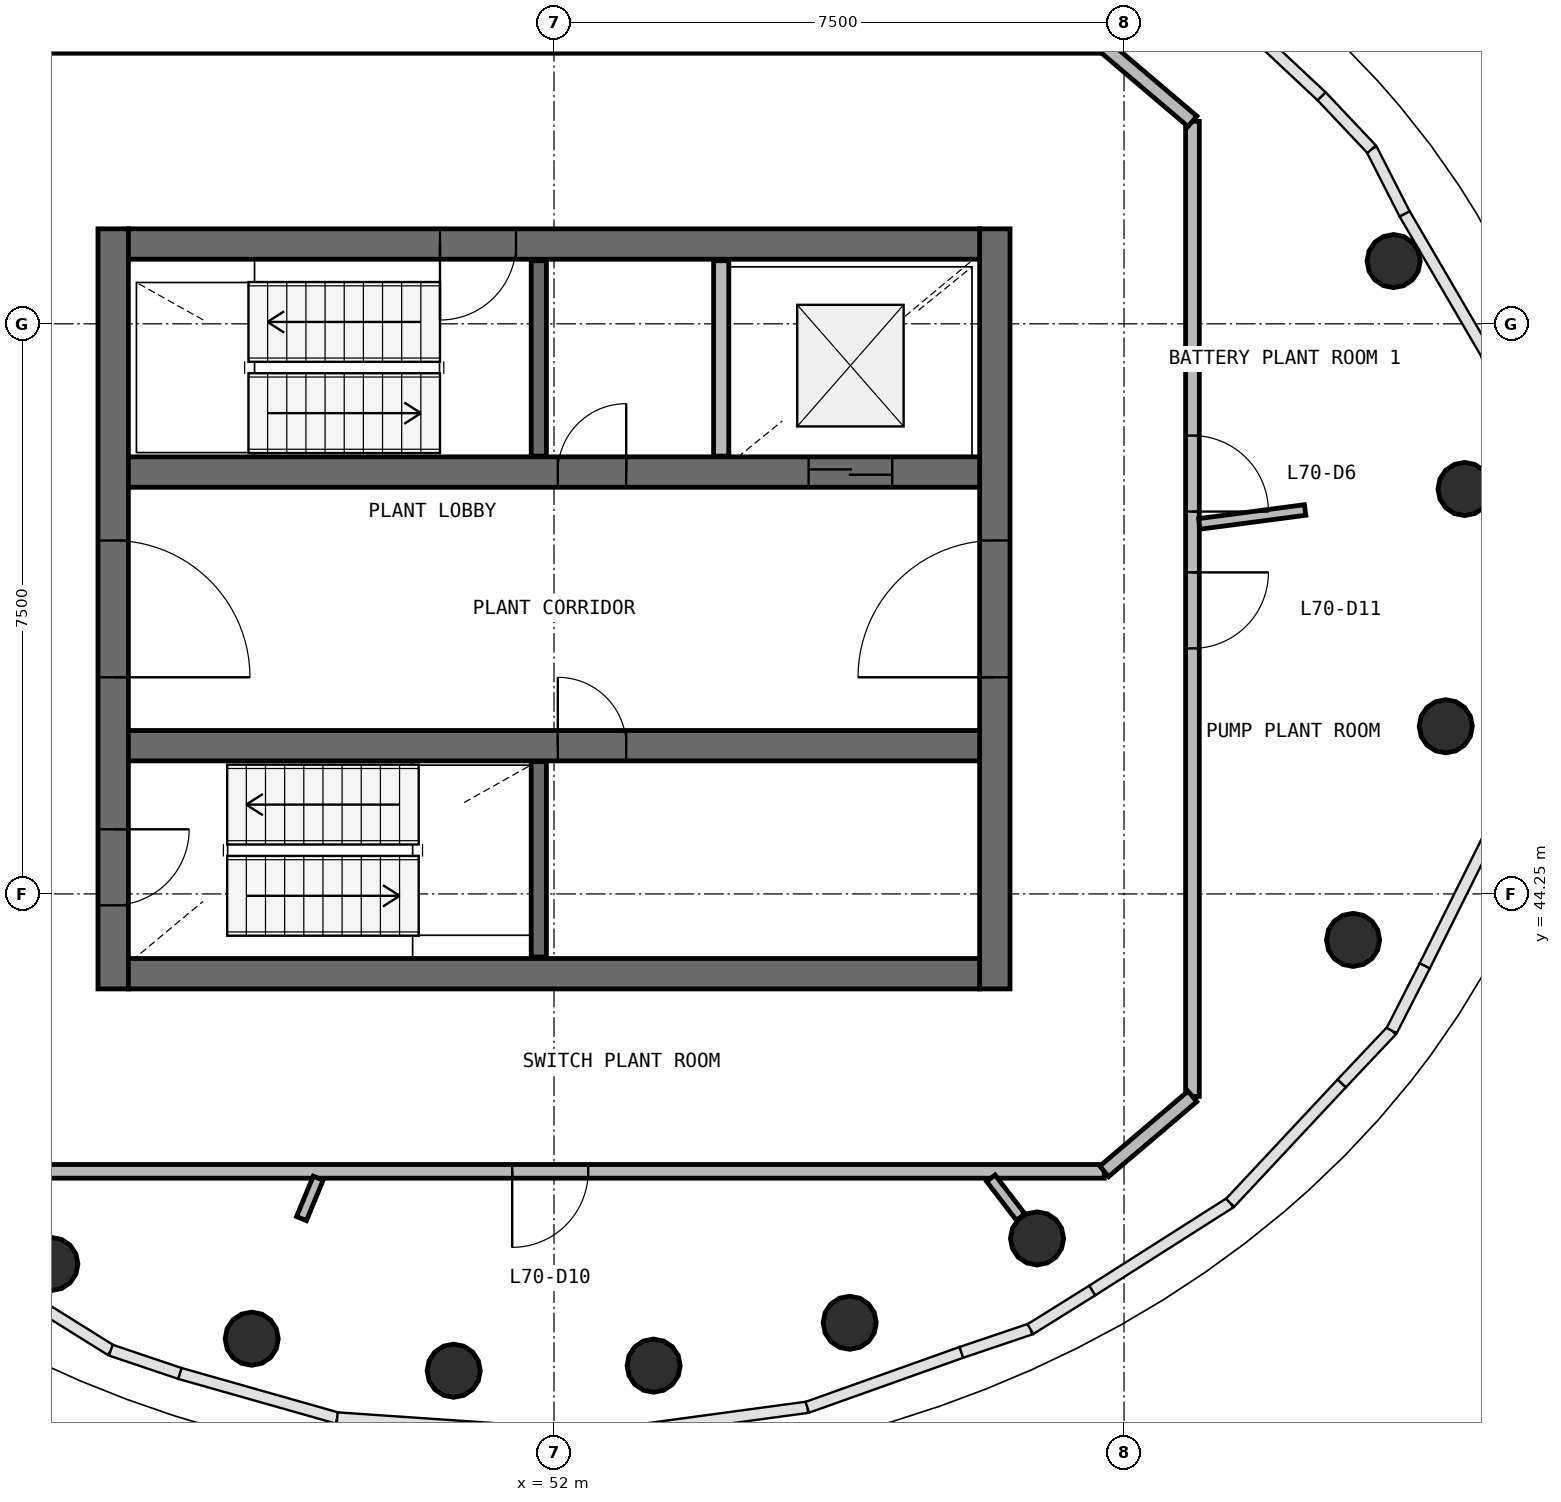
"""IFC4 building model, lengths in metres.
Left out: names, types, materials, properties, quantities, classifications, styles, units other than length and angle.
Written with IfcOpenShell. Run it as: python <this file> out.ifc"""

import sys

from ifc_helpers import new_model, si_unit, direction, frame, frame_2d, origin, origin_2d, place, context, subcontext, project, spatial, rectangle, circle, extrude, source, transform, mapped, element, fill, save


model = new_model("IFC4")
c1 = context("Model", 3, precision=1e-05, world=origin(), true_north=direction((0.0, 1.0)))
c2 = subcontext(c1, "Body", "Model", "MODEL_VIEW")
j1 = project(units=[si_unit("LENGTHUNIT", "METRE"), si_unit("PLANEANGLEUNIT", "RADIAN")], contexts=[c1])
p1 = place(None, origin())
s1 = spatial("IfcSite", under=j1, at=p1, CompositionType="ELEMENT")
p2 = place(p1, origin())
s2 = spatial("IfcBuilding", under=s1, at=p2, CompositionType="ELEMENT")
p3 = place(p2, frame((0.0, 0.0, 283.6)))
s3 = spatial("IfcBuildingStorey", under=s2, at=p3, CompositionType="ELEMENT", Elevation=283.6)
p4 = place(p3, frame((57.8, 43.0, 0.0), z_axis=(0.0, 0.0, 1.0), x_axis=(0.0, 1.0, 0.0)))
e1 = element("IfcWall", 1, at=p4, inside=s3, PredefinedType="SHEAR", context=c2, shape_type="SweptSolid", body=[
    extrude(rectangle(XDim=10.0, YDim=0.4, at=frame_2d((5.0, 0.0))), origin(), (0.0, 0.0, 1.0), 3.5),
])
p5 = place(p4, frame((4.1, 0.0, 0.0)))
e2 = element("IfcOpeningElement", 2, at=p5, cuts=e1, PredefinedType="OPENING", context=c2, shape_type="SweptSolid", body=[
    extrude(rectangle(XDim=1.8, YDim=2.1, at=frame_2d((0.9, 1.05))), frame((0.0, 0.21, 0.0), z_axis=(0.0, -1.0, 0.0), x_axis=(1.0, 0.0, 0.0)), (0.0, 0.0, 1.0), 0.42),
])
p6 = place(p3, frame((46.2, 53.0, 0.0), z_axis=(0.0, 0.0, 1.0), x_axis=(0.0, -1.0, 0.0)))
e3 = element("IfcWall", 3, at=p6, inside=s3, PredefinedType="SHEAR", context=c2, shape_type="SweptSolid", body=[
    extrude(rectangle(XDim=10.0, YDim=0.4, at=frame_2d((5.0, 0.0))), origin(), (0.0, 0.0, 1.0), 3.5),
])
p7 = place(p6, frame((4.1, 0.0, 0.0)))
e4 = element("IfcOpeningElement", 4, at=p7, cuts=e3, PredefinedType="OPENING", context=c2, shape_type="SweptSolid", body=[
    extrude(rectangle(XDim=1.8, YDim=2.1, at=frame_2d((0.9, 1.05))), frame((0.0, 0.21, 0.0), z_axis=(0.0, -1.0, 0.0), x_axis=(1.0, 0.0, 0.0)), (0.0, 0.0, 1.0), 0.42),
])
p8 = place(p6, frame((7.9, 0.0, 0.0)))
e5 = element("IfcOpeningElement", 5, at=p8, cuts=e3, PredefinedType="OPENING", context=c2, shape_type="SweptSolid", body=[
    extrude(rectangle(XDim=1.0, YDim=2.1, at=frame_2d((0.5, 1.05))), frame((0.0, 0.21, 0.0), z_axis=(0.0, -1.0, 0.0), x_axis=(1.0, 0.0, 0.0)), (0.0, 0.0, 1.0), 0.42),
])
p9 = place(p3, frame((46.4, 43.2, 0.0), z_axis=(0.0, 0.0, 1.0), x_axis=(1.0, 0.0, 0.0)))
e6 = element("IfcWall", 6, at=p9, inside=s3, PredefinedType="SHEAR", context=c2, shape_type="SweptSolid", body=[
    extrude(rectangle(XDim=11.2, YDim=0.4, at=frame_2d((5.6, 0.0))), origin(), (0.0, 0.0, 1.0), 3.5),
])
p10 = place(p3, frame((57.6, 52.8, 0.0), z_axis=(0.0, 0.0, 1.0), x_axis=(-1.0, 0.0, 0.0)))
e7 = element("IfcWall", 7, at=p10, inside=s3, PredefinedType="SHEAR", context=c2, shape_type="SweptSolid", body=[
    extrude(rectangle(XDim=11.2, YDim=0.4, at=frame_2d((5.6, 0.0))), origin(), (0.0, 0.0, 1.0), 3.5),
])
p11 = place(p10, frame((6.1, 0.0, 0.0)))
e8 = element("IfcOpeningElement", 8, at=p11, cuts=e7, PredefinedType="OPENING", context=c2, shape_type="SweptSolid", body=[
    extrude(rectangle(XDim=1.0, YDim=2.1, at=frame_2d((0.5, 1.05))), frame((0.0, 0.21, 0.0), z_axis=(0.0, -1.0, 0.0), x_axis=(1.0, 0.0, 0.0)), (0.0, 0.0, 1.0), 0.42),
])
p12 = place(p3, frame((46.4, 49.8, 0.0), z_axis=(0.0, 0.0, 1.0), x_axis=(1.0, 0.0, 0.0)))
e9 = element("IfcWall", 9, at=p12, inside=s3, PredefinedType="SHEAR", context=c2, shape_type="SweptSolid", body=[
    extrude(rectangle(XDim=11.2, YDim=0.4, at=frame_2d((5.6, 0.0))), origin(), (0.0, 0.0, 1.0), 3.5),
])
p13 = place(p12, frame((8.95, 0.0, 0.0)))
e10 = element("IfcOpeningElement", 10, at=p13, cuts=e9, PredefinedType="OPENING", context=c2, shape_type="SweptSolid", body=[
    extrude(rectangle(XDim=1.1, YDim=2.1, at=frame_2d((0.55, 1.05))), frame((0.0, 0.21, 0.0), z_axis=(0.0, -1.0, 0.0), x_axis=(1.0, 0.0, 0.0)), (0.0, 0.0, 1.0), 0.42),
])
p14 = place(p12, frame((5.65, 0.0, 0.0)))
e11 = element("IfcOpeningElement", 11, at=p14, cuts=e9, PredefinedType="OPENING", context=c2, shape_type="SweptSolid", body=[
    extrude(rectangle(XDim=0.9, YDim=2.1, at=frame_2d((0.45, 1.05))), frame((0.0, 0.21, 0.0), z_axis=(0.0, -1.0, 0.0), x_axis=(1.0, 0.0, 0.0)), (0.0, 0.0, 1.0), 0.42),
])
p15 = place(p3, frame((46.4, 46.2, 0.0), z_axis=(0.0, 0.0, 1.0), x_axis=(1.0, 0.0, 0.0)))
e12 = element("IfcWall", 12, at=p15, inside=s3, PredefinedType="SHEAR", context=c2, shape_type="SweptSolid", body=[
    extrude(rectangle(XDim=11.2, YDim=0.4, at=frame_2d((5.6, 0.0))), origin(), (0.0, 0.0, 1.0), 3.5),
])
p16 = place(p15, frame((5.65, 0.0, 0.0)))
e13 = element("IfcOpeningElement", 13, at=p16, cuts=e12, PredefinedType="OPENING", context=c2, shape_type="SweptSolid", body=[
    extrude(rectangle(XDim=0.9, YDim=2.1, at=frame_2d((0.45, 1.05))), frame((0.0, 0.21, 0.0), z_axis=(0.0, -1.0, 0.0), x_axis=(1.0, 0.0, 0.0)), (0.0, 0.0, 1.0), 0.42),
])
m1 = source(origin(), c2, "Body", "SweptSolid", [
    extrude(circle(Radius=0.35, at=origin_2d()), origin(), (0.0, 0.0, 1.0), 4.014),
])
p17 = place(p3, frame((63.98, 49.577, 0.174), z_axis=(-0.485558404991, -0.063918071599, 0.871864390525), x_axis=(0.130512333023, -0.991446685873, 0.0)))
e14 = element("IfcColumn", 14, at=p17, inside=s3, PredefinedType="COLUMN", context=c2, shape_type="MappedRepresentation", body=[
    mapped(m1, transform((0.0, 0.0, 0.0), scale=1.0)),
])
m2 = source(origin(), c2, "Body", "SweptSolid", [
    extrude(circle(Radius=0.35, at=origin_2d()), origin(), (0.0, 0.0, 1.0), 4.07),
])
p18 = place(p3, frame((63.047, 52.576, 0.181), z_axis=(-0.471365631204, -0.195217483001, 0.86006079788), x_axis=(0.382635660379, -0.923899318869, 0.0)))
e15 = element("IfcColumn", 15, at=p18, inside=s3, PredefinedType="COLUMN", context=c2, shape_type="MappedRepresentation", body=[
    mapped(m2, transform((0.0, 0.0, 0.0), scale=1.0)),
])
m3 = source(origin(), c2, "Body", "SweptSolid", [
    extrude(circle(Radius=0.35, at=origin_2d()), origin(), (0.0, 0.0, 1.0), 3.908),
])
p19 = place(p3, frame((58.613, 56.619, 0.159), z_axis=(-0.270755010199, -0.352968575825, 0.89560309788), x_axis=(0.793448113602, -0.608637898115, 0.0)))
e16 = element("IfcColumn", 16, at=p19, inside=s3, PredefinedType="COLUMN", context=c2, shape_type="MappedRepresentation", body=[
    mapped(m3, transform((0.0, 0.0, 0.0), scale=1.0)),
])
m4 = source(origin(), c2, "Body", "SweptSolid", [
    extrude(circle(Radius=0.35, at=origin_2d()), origin(), (0.0, 0.0, 1.0), 3.739),
])
p20 = place(p3, frame((45.645, 56.282, 0.126), z_axis=(0.213995199353, -0.278905552773, 0.936171857773), x_axis=(0.793376088289, 0.608731782094, 0.0)))
e17 = element("IfcColumn", 17, at=p20, inside=s3, PredefinedType="COLUMN", context=c2, shape_type="MappedRepresentation", body=[
    mapped(m4, transform((0.0, 0.0, 0.0), scale=1.0)),
])
p21 = place(p3, frame((45.387, 39.381, 0.159), z_axis=(0.270755010199, 0.352968575825, 0.89560309788), x_axis=(-0.793448113602, 0.608637898115, 0.0)))
e18 = element("IfcColumn", 18, at=p21, inside=s3, PredefinedType="COLUMN", context=c2, shape_type="MappedRepresentation", body=[
    mapped(m3, transform((0.0, 0.0, 0.0), scale=1.0)),
])
m5 = source(origin(), c2, "Body", "SweptSolid", [
    extrude(circle(Radius=0.35, at=origin_2d()), origin(), (0.0, 0.0, 1.0), 3.833),
])
p22 = place(p3, frame((48.023, 38.398, 0.146), z_axis=(0.156153714732, 0.376946915782, 0.912977020553), x_axis=(-0.923864636245, 0.382719393153, 0.0)))
e19 = element("IfcColumn", 19, at=p22, inside=s3, PredefinedType="COLUMN", context=c2, shape_type="MappedRepresentation", body=[
    mapped(m5, transform((0.0, 0.0, 0.0), scale=1.0)),
])
m6 = source(origin(), c2, "Body", "SweptSolid", [
    extrude(circle(Radius=0.35, at=origin_2d()), origin(), (0.0, 0.0, 1.0), 3.784),
])
p23 = place(p3, frame((50.68, 37.977, 0.136), z_axis=(0.049674543277, 0.377074942147, 0.924849678464), x_axis=(-0.99143407694, 0.130608081992, 0.0)))
e20 = element("IfcColumn", 20, at=p23, inside=s3, PredefinedType="COLUMN", context=c2, shape_type="MappedRepresentation", body=[
    mapped(m6, transform((0.0, 0.0, 0.0), scale=1.0)),
])
m7 = source(origin(), c2, "Body", "SweptSolid", [
    extrude(circle(Radius=0.35, at=origin_2d()), origin(), (0.0, 0.0, 1.0), 3.759),
])
p24 = place(p3, frame((53.311, 38.044, 0.131), z_axis=(-0.047669920911, 0.361745857591, 0.931057201871), x_axis=(-0.991428831601, -0.13064789271, 0.0)))
e21 = element("IfcColumn", 21, at=p24, inside=s3, PredefinedType="COLUMN", context=c2, shape_type="MappedRepresentation", body=[
    mapped(m7, transform((0.0, 0.0, 0.0), scale=1.0)),
])
m8 = source(origin(), c2, "Body", "SweptSolid", [
    extrude(circle(Radius=0.35, at=origin_2d()), origin(), (0.0, 0.0, 1.0), 3.747),
])
p25 = place(p3, frame((55.89, 38.608, 0.128), z_axis=(-0.136577604612, 0.329715018769, 0.934149112464), x_axis=(-0.923874408562, -0.38269580244, 0.0)))
e22 = element("IfcColumn", 22, at=p25, inside=s3, PredefinedType="COLUMN", context=c2, shape_type="MappedRepresentation", body=[
    mapped(m8, transform((0.0, 0.0, 0.0), scale=1.0)),
])
p26 = place(p3, frame((58.355, 39.718, 0.126), z_axis=(-0.213995199353, 0.278905552773, 0.936171857773), x_axis=(-0.793376088289, -0.608731782094, 0.0)))
e23 = element("IfcColumn", 23, at=p26, inside=s3, PredefinedType="COLUMN", context=c2, shape_type="MappedRepresentation", body=[
    mapped(m4, transform((0.0, 0.0, 0.0), scale=1.0)),
])
m9 = source(origin(), c2, "Body", "SweptSolid", [
    extrude(circle(Radius=0.35, at=origin_2d()), origin(), (0.0, 0.0, 1.0), 3.807),
])
p27 = place(p3, frame((62.513, 43.645, 0.141), z_axis=(-0.363645996148, 0.150626775693, 0.919278610613), x_axis=(-0.382682721486, -0.923879826967, 0.0)))
e24 = element("IfcColumn", 24, at=p27, inside=s3, PredefinedType="COLUMN", context=c2, shape_type="MappedRepresentation", body=[
    mapped(m9, transform((0.0, 0.0, 0.0), scale=1.0)),
])
m10 = source(origin(), c2, "Body", "SweptSolid", [
    extrude(circle(Radius=0.35, at=origin_2d()), origin(), (0.0, 0.0, 1.0), 3.898),
])
p28 = place(p3, frame((63.733, 46.455, 0.157), z_axis=(-0.436576513493, 0.057492072785, 0.897828273911), x_axis=(-0.13056120367, -0.9914402514, 0.0)))
e25 = element("IfcColumn", 25, at=p28, inside=s3, PredefinedType="COLUMN", context=c2, shape_type="MappedRepresentation", body=[
    mapped(m10, transform((0.0, 0.0, 0.0), scale=1.0)),
])
for number, where, z_axis, x_axis in (
    (26, (51.8, 43.42, 0.0), (0.0, 0.0, 1.0), (0.0, 1.0, 0.0)),
    (27, (51.8, 50.01, 0.0), (0.0, 0.0, 1.0), (0.0, 1.0, 0.0)),
    (28, (54.2, 52.58, 0.0), (0.0, 0.0, 1.0), (0.0, -1.0, 0.0)),
):
    element("IfcWall", number, at=place(p3, frame(where, z_axis=z_axis, x_axis=x_axis)), inside=s3, PredefinedType="SOLIDWALL", context=c2, shape_type="SweptSolid", body=[
        extrude(rectangle(XDim=2.57, YDim=0.2, at=frame_2d((1.285, 0.0))), origin(), (0.0, 0.0, 1.0), 3.22),
    ])
p29 = place(p3, frame((44.76, 55.4, 0.0), z_axis=(0.0, 0.0, 1.0), x_axis=(1.0, 0.0, 0.0)))
e29 = element("IfcWall", 29, at=p29, inside=s3, PredefinedType="PARTITIONING", context=c2, shape_type="SweptSolid", body=[
    extrude(rectangle(XDim=14.479, YDim=0.18, at=frame_2d((7.24, 0.0))), origin(), (0.0, 0.0, 1.0), 2.62),
])
p30 = place(p29, frame((6.79, 0.0, 0.0)))
e30 = element("IfcOpeningElement", 30, at=p30, cuts=e29, PredefinedType="OPENING", context=c2, shape_type="SweptSolid", body=[
    extrude(rectangle(XDim=1.0, YDim=2.1, at=frame_2d((0.5, 1.05))), frame((0.0, 0.1, 0.0), z_axis=(0.0, -1.0, 0.0), x_axis=(1.0, 0.0, 0.0)), (0.0, 0.0, 1.0), 0.2),
])
p31 = place(p3, frame((59.24, 40.6, 0.0), z_axis=(0.0, 0.0, 1.0), x_axis=(-1.0, 0.0, 0.0)))
e31 = element("IfcWall", 31, at=p31, inside=s3, PredefinedType="PARTITIONING", context=c2, shape_type="SweptSolid", body=[
    extrude(rectangle(XDim=14.479, YDim=0.18, at=frame_2d((7.24, 0.0))), origin(), (0.0, 0.0, 1.0), 2.62),
])
p32 = place(p31, frame((6.79, 0.0, 0.0)))
e32 = element("IfcOpeningElement", 32, at=p32, cuts=e31, PredefinedType="OPENING", context=c2, shape_type="SweptSolid", body=[
    extrude(rectangle(XDim=1.0, YDim=2.1, at=frame_2d((0.5, 1.05))), frame((0.0, 0.1, 0.0), z_axis=(0.0, -1.0, 0.0), x_axis=(1.0, 0.0, 0.0)), (0.0, 0.0, 1.0), 0.2),
])
p33 = place(p3, frame((60.4, 54.414, 0.0), z_axis=(0.0, 0.0, 1.0), x_axis=(0.0, -1.0, 0.0)))
e33 = element("IfcWall", 33, at=p33, inside=s3, PredefinedType="PARTITIONING", context=c2, shape_type="SweptSolid", body=[
    extrude(rectangle(XDim=12.829, YDim=0.18, at=frame_2d((6.414, 0.0))), origin(), (0.0, 0.0, 1.0), 2.62),
])
p34 = place(p33, frame((4.134, 0.0, 0.0)))
e34 = element("IfcOpeningElement", 34, at=p34, cuts=e33, PredefinedType="OPENING", context=c2, shape_type="SweptSolid", body=[
    extrude(rectangle(XDim=1.0, YDim=2.1, at=frame_2d((0.5, 1.05))), frame((0.0, 0.1, 0.0), z_axis=(0.0, -1.0, 0.0), x_axis=(1.0, 0.0, 0.0)), (0.0, 0.0, 1.0), 0.2),
])
p35 = place(p33, frame((5.934, 0.0, 0.0)))
e35 = element("IfcOpeningElement", 35, at=p35, cuts=e33, PredefinedType="OPENING", context=c2, shape_type="SweptSolid", body=[
    extrude(rectangle(XDim=1.0, YDim=2.1, at=frame_2d((0.5, 1.05))), frame((0.0, 0.1, 0.0), z_axis=(0.0, -1.0, 0.0), x_axis=(1.0, 0.0, 0.0)), (0.0, 0.0, 1.0), 0.2),
])
p36 = place(p3, frame((60.49, 49.118, 0.0), z_axis=(0.0, 0.0, 1.0), x_axis=(0.991446604194, 0.130512953506, 0.0)))
e36 = element("IfcWall", 36, at=p36, inside=s3, PredefinedType="PARTITIONING", context=c2, shape_type="SweptSolid", body=[
    extrude(rectangle(XDim=1.405, YDim=0.14, at=frame_2d((0.702, 0.0))), origin(), (0.0, 0.0, 1.0), 2.62),
])
p37 = place(p3, frame((48.897, 40.51, 0.0), z_axis=(0.0, 0.0, 1.0), x_axis=(-0.382564297979, -0.923928870591, 0.0)))
e37 = element("IfcWall", 37, at=p37, inside=s3, PredefinedType="PARTITIONING", context=c2, shape_type="SweptSolid", body=[
    extrude(rectangle(XDim=0.575, YDim=0.14, at=frame_2d((0.288, 0.0))), origin(), (0.0, 0.0, 1.0), 2.62),
])
p38 = place(p3, frame((57.747, 40.51, 0.0), z_axis=(0.0, 0.0, 1.0), x_axis=(0.608757758263, -0.79335615694, 0.0)))
e38 = element("IfcWall", 38, at=p38, inside=s3, PredefinedType="PARTITIONING", context=c2, shape_type="SweptSolid", body=[
    extrude(rectangle(XDim=0.644, YDim=0.14, at=frame_2d((0.322, 0.0))), origin(), (0.0, 0.0, 1.0), 2.62),
])
for number, where, z_axis, x_axis in (
    (39, (59.24, 55.4, 0.0), (0.0, 0.0, 1.0), (0.762, -0.647, 0.0)),
    (40, (59.24, 40.6, 0.0), (0.0, 0.0, 1.0), (0.762, 0.647, 0.0)),
):
    element("IfcWall", number, at=place(p3, frame(where, z_axis=z_axis, x_axis=x_axis)), inside=s3, PredefinedType="PARTITIONING", context=c2, shape_type="SweptSolid", body=[
        extrude(rectangle(XDim=1.522, YDim=0.18, at=frame_2d((0.761, 0.0))), origin(), (0.0, 0.0, 1.0), 2.62),
    ])
m11 = source(origin(), c2, "Body", "SweptSolid", [
    extrude(rectangle(XDim=1.8, YDim=2.1, at=frame_2d((0.9, 1.05))), frame((0.0, 0.025, 0.0), z_axis=(0.0, -1.0, 0.0), x_axis=(1.0, 0.0, 0.0)), (0.0, 0.0, 1.0), 0.05),
])
p39 = place(p7, origin())
e41 = element("IfcDoor", 41, at=p39, inside=s3, OperationType="SINGLE_SWING_RIGHT", PredefinedType="DOOR", context=c2, shape_type="MappedRepresentation", body=[
    mapped(m11, transform((0.0, 0.0, 0.0), scale=1.0)),
])
fill(e4, e41)
p40 = place(p5, origin())
e42 = element("IfcDoor", 42, at=p40, inside=s3, OperationType="SINGLE_SWING_LEFT", PredefinedType="DOOR", context=c2, shape_type="MappedRepresentation", body=[
    mapped(m11, transform((0.0, 0.0, 0.0), scale=1.0)),
])
fill(e2, e42)
m12 = source(origin(), c2, "Body", "SweptSolid", [
    extrude(rectangle(XDim=1.0, YDim=2.1, at=frame_2d((0.5, 1.05))), frame((0.0, 0.025, 0.0), z_axis=(0.0, -1.0, 0.0), x_axis=(1.0, 0.0, 0.0)), (0.0, 0.0, 1.0), 0.05),
])
p41 = place(p11, origin())
e43 = element("IfcDoor", 43, at=p41, inside=s3, OperationType="SINGLE_SWING_RIGHT", PredefinedType="DOOR", context=c2, shape_type="MappedRepresentation", body=[
    mapped(m12, transform((0.0, 0.0, 0.0), scale=1.0)),
])
fill(e8, e43)
p42 = place(p8, origin())
e44 = element("IfcDoor", 44, at=p42, inside=s3, OperationType="SINGLE_SWING_LEFT", PredefinedType="DOOR", context=c2, shape_type="MappedRepresentation", body=[
    mapped(m12, transform((0.0, 0.0, 0.0), scale=1.0)),
])
fill(e5, e44)
m13 = source(origin(), c2, "Body", "SweptSolid", [
    extrude(rectangle(XDim=1.1, YDim=2.1, at=frame_2d((0.55, 1.05))), frame((0.0, 0.025, 0.0), z_axis=(0.0, -1.0, 0.0), x_axis=(1.0, 0.0, 0.0)), (0.0, 0.0, 1.0), 0.05),
])
p43 = place(p13, origin())
e45 = element("IfcDoor", 45, at=p43, inside=s3, OperationType="DOUBLE_DOOR_SLIDING", PredefinedType="USERDEFINED", context=c2, shape_type="MappedRepresentation", body=[
    mapped(m13, transform((0.0, 0.0, 0.0), scale=1.0)),
])
fill(e10, e45)
m14 = source(origin(), c2, "Body", "SweptSolid", [
    extrude(rectangle(XDim=1.0, YDim=2.1, at=frame_2d((0.5, 1.05))), frame((0.0, 0.025, 0.0), z_axis=(0.0, -1.0, 0.0), x_axis=(1.0, 0.0, 0.0)), (0.0, 0.0, 1.0), 0.05),
])
p44 = place(p34, origin())
e46 = element("IfcDoor", 46, at=p44, inside=s3, OperationType="SINGLE_SWING_RIGHT", PredefinedType="DOOR", context=c2, shape_type="MappedRepresentation", body=[
    mapped(m14, transform((0.0, 0.0, 0.0), scale=1.0)),
])
fill(e34, e46)
p45 = place(p32, origin())
e47 = element("IfcDoor", 47, at=p45, inside=s3, OperationType="SINGLE_SWING_RIGHT", PredefinedType="DOOR", context=c2, shape_type="MappedRepresentation", body=[
    mapped(m14, transform((0.0, 0.0, 0.0), scale=1.0)),
])
fill(e32, e47)
p46 = place(p35, origin())
e48 = element("IfcDoor", 48, at=p46, inside=s3, OperationType="SINGLE_SWING_LEFT", PredefinedType="DOOR", context=c2, shape_type="MappedRepresentation", body=[
    mapped(m14, transform((0.0, 0.0, 0.0), scale=1.0)),
])
fill(e35, e48)
m15 = source(origin(), c2, "Body", "SweptSolid", [
    extrude(rectangle(XDim=0.9, YDim=2.1, at=frame_2d((0.45, 1.05))), frame((0.0, 0.025, 0.0), z_axis=(0.0, -1.0, 0.0), x_axis=(1.0, 0.0, 0.0)), (0.0, 0.0, 1.0), 0.05),
])
p47 = place(p14, origin())
e49 = element("IfcDoor", 49, at=p47, inside=s3, OperationType="SINGLE_SWING_RIGHT", PredefinedType="DOOR", context=c2, shape_type="MappedRepresentation", body=[
    mapped(m15, transform((0.0, 0.0, 0.0), scale=1.0)),
])
fill(e11, e49)
p48 = place(p16, origin())
e50 = element("IfcDoor", 50, at=p48, inside=s3, OperationType="SINGLE_SWING_LEFT", PredefinedType="DOOR", context=c2, shape_type="MappedRepresentation", body=[
    mapped(m15, transform((0.0, 0.0, 0.0), scale=1.0)),
])
fill(e13, e50)
save(model, sys.argv[1])
